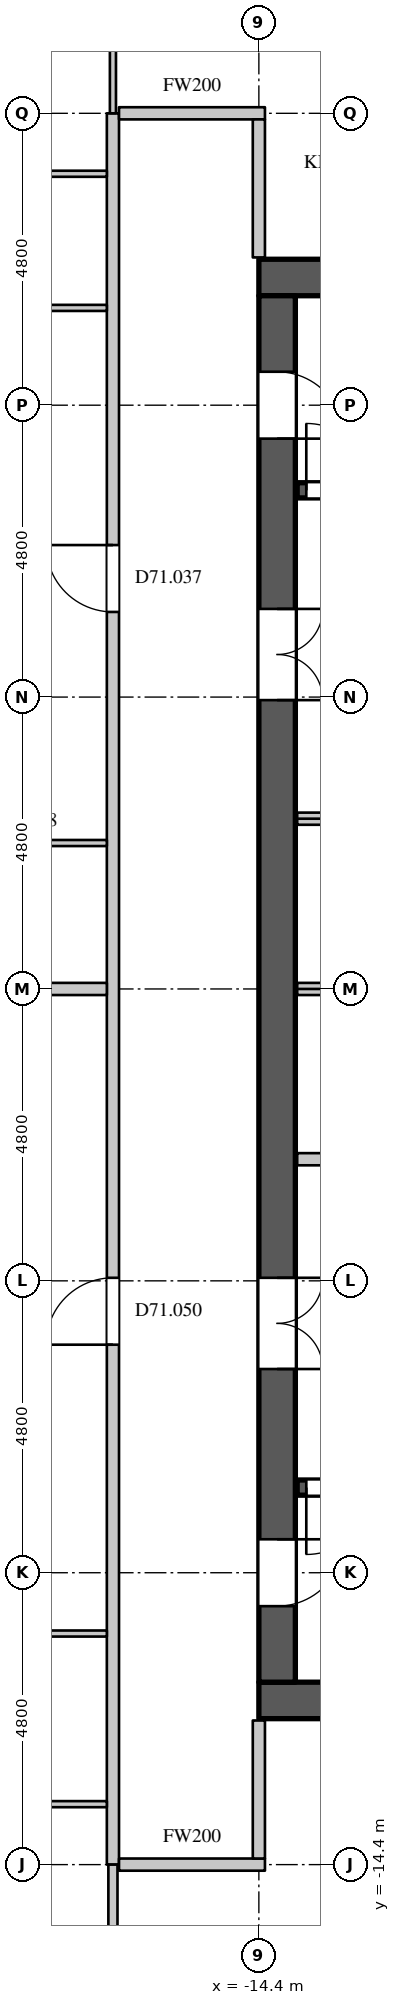
"""IFC4 building model, lengths in metres.
Left out: names, types, materials, properties, quantities, classifications, styles, units other than length and angle.
Written with IfcOpenShell. Run it as: python <this file> out.ifc"""

import sys

from ifc_helpers import new_model, si_unit, direction, frame, frame_2d, origin, place, context, subcontext, project, spatial, rectangle, extrude, element, fill, save


model = new_model("IFC4")
c1 = context("Model", 3, precision=1e-05, world=origin(), true_north=direction((0.0, 1.0)))
c2 = subcontext(c1, "Body", "Model", "MODEL_VIEW")
j1 = project(units=[si_unit("LENGTHUNIT", "METRE"), si_unit("PLANEANGLEUNIT", "RADIAN")], contexts=[c1])
p1 = place(None, origin())
s1 = spatial("IfcSite", under=j1, at=p1, CompositionType="ELEMENT")
p2 = place(p1, origin())
s2 = spatial("IfcBuilding", under=s1, at=p2, CompositionType="ELEMENT")
p3 = place(p2, frame((0.0, 0.0, 306.3)))
s3 = spatial("IfcBuildingStorey", under=s2, at=p3, CompositionType="ELEMENT", Elevation=306.3)
for number, where, z_axis, x_axis in (
    (1, (-14.4, 11.7, 0.0), (0.0, 0.0, 1.0), (1.0, 0.0, 0.0)),
    (2, (-14.4, -11.7, 0.0), (0.0, 0.0, 1.0), (1.0, 0.0, 0.0)),
):
    element("IfcWall", number, at=place(p3, frame(where, z_axis=z_axis, x_axis=x_axis)), inside=s3, PredefinedType="SHEAR", context=c2, shape_type="SweptSolid", body=[
        extrude(rectangle(XDim=28.8, YDim=0.6, at=frame_2d((14.4, 0.0))), origin(), (0.0, 0.0, 1.0), 4.2),
    ])
p4 = place(p3, frame((-14.1, -11.4, 0.0), z_axis=(0.0, 0.0, 1.0), x_axis=(0.0, 1.0, 0.0)))
e3 = element("IfcWall", 3, at=p4, inside=s3, PredefinedType="SHEAR", context=c2, shape_type="SweptSolid", body=[
    extrude(rectangle(XDim=22.8, YDim=0.6, at=frame_2d((11.4, 0.0))), origin(), (0.0, 0.0, 1.0), 4.2),
])
p5 = place(p4, frame((20.45, 0.0, 0.0)))
e4 = element("IfcOpeningElement", 4, at=p5, cuts=e3, PredefinedType="OPENING", context=c2, shape_type="SweptSolid", body=[
    extrude(rectangle(XDim=1.1, YDim=2.2, at=frame_2d((0.55, 1.1))), frame((0.0, 0.31, 0.0), z_axis=(0.0, -1.0, 0.0), x_axis=(1.0, 0.0, 0.0)), (0.0, 0.0, 1.0), 0.62),
])
p6 = place(p4, frame((1.25, 0.0, 0.0)))
e5 = element("IfcOpeningElement", 5, at=p6, cuts=e3, PredefinedType="OPENING", context=c2, shape_type="SweptSolid", body=[
    extrude(rectangle(XDim=1.1, YDim=2.2, at=frame_2d((0.55, 1.1))), frame((0.0, 0.31, 0.0), z_axis=(0.0, -1.0, 0.0), x_axis=(1.0, 0.0, 0.0)), (0.0, 0.0, 1.0), 0.62),
])
p7 = place(p4, frame((16.15, 0.0, 0.0)))
e6 = element("IfcOpeningElement", 6, at=p7, cuts=e3, PredefinedType="OPENING", context=c2, shape_type="SweptSolid", body=[
    extrude(rectangle(XDim=1.5, YDim=2.4, at=frame_2d((0.75, 1.2))), frame((0.0, 0.31, 0.0), z_axis=(0.0, -1.0, 0.0), x_axis=(1.0, 0.0, 0.0)), (0.0, 0.0, 1.0), 0.62),
])
p8 = place(p4, frame((5.15, 0.0, 0.0)))
e7 = element("IfcOpeningElement", 7, at=p8, cuts=e3, PredefinedType="OPENING", context=c2, shape_type="SweptSolid", body=[
    extrude(rectangle(XDim=1.5, YDim=2.4, at=frame_2d((0.75, 1.2))), frame((0.0, 0.31, 0.0), z_axis=(0.0, -1.0, 0.0), x_axis=(1.0, 0.0, 0.0)), (0.0, 0.0, 1.0), 0.62),
])
p9 = place(p3, frame((-16.8, -14.4, 0.0), z_axis=(0.0, 0.0, 1.0), x_axis=(0.0, 1.0, 0.0)))
e8 = element("IfcWall", 8, at=p9, inside=s3, PredefinedType="PARTITIONING", context=c2, shape_type="SweptSolid", body=[
    extrude(rectangle(XDim=28.8, YDim=0.2, at=frame_2d((14.4, 0.0))), origin(), (0.0, 0.0, 1.0), 3.9),
])
p10 = place(p9, frame((20.6, 0.0, 0.0)))
e9 = element("IfcOpeningElement", 9, at=p10, cuts=e8, PredefinedType="OPENING", context=c2, shape_type="SweptSolid", body=[
    extrude(rectangle(XDim=1.1, YDim=2.4, at=frame_2d((0.55, 1.2))), frame((0.0, 0.11, 0.0), z_axis=(0.0, -1.0, 0.0), x_axis=(1.0, 0.0, 0.0)), (0.0, 0.0, 1.0), 0.22),
])
p11 = place(p9, frame((8.55, 0.0, 0.0)))
e10 = element("IfcOpeningElement", 10, at=p11, cuts=e8, PredefinedType="OPENING", context=c2, shape_type="SweptSolid", body=[
    extrude(rectangle(XDim=1.1, YDim=2.4, at=frame_2d((0.55, 1.2))), frame((0.0, 0.11, 0.0), z_axis=(0.0, -1.0, 0.0), x_axis=(1.0, 0.0, 0.0)), (0.0, 0.0, 1.0), 0.22),
])
for number, where, z_axis, x_axis in (
    (11, (-16.7, -14.4, 0.0), (0.0, 0.0, 1.0), (1.0, 0.0, 0.0)),
    (12, (-16.7, 14.4, 0.0), (0.0, 0.0, 1.0), (1.0, 0.0, 0.0)),
):
    element("IfcWall", number, at=place(p3, frame(where, z_axis=z_axis, x_axis=x_axis)), inside=s3, PredefinedType="PARTITIONING", context=c2, shape_type="SweptSolid", body=[
        extrude(rectangle(XDim=2.4, YDim=0.2, at=frame_2d((1.2, 0.0))), origin(), (0.0, 0.0, 1.0), 3.9),
    ])
for number, where, z_axis, x_axis in (
    (13, (-14.4, -14.3, 0.0), (0.0, 0.0, 1.0), (0.0, 1.0, 0.0)),
    (14, (-14.4, 12.03, 0.0), (0.0, 0.0, 1.0), (0.0, 1.0, 0.0)),
):
    element("IfcWall", number, at=place(p3, frame(where, z_axis=z_axis, x_axis=x_axis)), inside=s3, PredefinedType="PARTITIONING", context=c2, shape_type="SweptSolid", body=[
        extrude(rectangle(XDim=2.27, YDim=0.2, at=frame_2d((1.135, 0.0))), origin(), (0.0, 0.0, 1.0), 3.9),
    ])
p12 = place(p3, frame((-16.8, -19.828, 0.0), z_axis=(0.0, 0.0, 1.0), x_axis=(0.0, 1.0, 0.0)))
e15 = element("IfcWall", 15, at=p12, inside=s3, PredefinedType="PARTITIONING", context=c2, shape_type="SweptSolid", body=[
    extrude(rectangle(XDim=5.428, YDim=0.15, at=frame_2d((2.714, 0.0))), origin(), (0.0, 0.0, 1.0), 3.9),
])
p13 = place(p12, frame((2.45, 0.0, 0.0)))
e16 = element("IfcOpeningElement", 16, at=p13, cuts=e15, PredefinedType="OPENING", context=c2, shape_type="SweptSolid", body=[
    extrude(rectangle(XDim=0.9, YDim=2.2, at=frame_2d((0.45, 1.1))), frame((0.0, 0.085, 0.0), z_axis=(0.0, -1.0, 0.0), x_axis=(1.0, 0.0, 0.0)), (0.0, 0.0, 1.0), 0.17),
])
p14 = place(p3, frame((-26.455, 0.0, 0.0), z_axis=(0.0, 0.0, 1.0), x_axis=(1.0, 0.0, 0.0)))
e17 = element("IfcWall", 17, at=p14, inside=s3, PredefinedType="PARTITIONING", context=c2, shape_type="SweptSolid", body=[
    extrude(rectangle(XDim=9.555, YDim=0.2, at=frame_2d((4.778, 0.0))), origin(), (0.0, 0.0, 1.0), 3.9),
])
p15 = place(p3, frame((-13.77, -2.8, 0.0), z_axis=(0.0, 0.0, 1.0), x_axis=(1.0, 0.0, 0.0)))
e18 = element("IfcWall", 18, at=p15, inside=s3, PredefinedType="PARTITIONING", context=c2, shape_type="SweptSolid", body=[
    extrude(rectangle(XDim=3.37, YDim=0.2, at=frame_2d((1.685, 0.0))), origin(), (0.0, 0.0, 1.0), 3.9),
])
p16 = place(p15, frame((1.35, 0.0, 0.0)))
e19 = element("IfcOpeningElement", 19, at=p16, cuts=e18, PredefinedType="OPENING", context=c2, shape_type="SweptSolid", body=[
    extrude(rectangle(XDim=0.6, YDim=2.0, at=frame_2d((0.3, 1.0))), frame((0.0, 0.11, 0.0), z_axis=(0.0, -1.0, 0.0), x_axis=(1.0, 0.0, 0.0)), (0.0, 0.0, 1.0), 0.22),
])
p17 = place(p3, frame((-13.77, 0.0, 0.0), z_axis=(0.0, 0.0, 1.0), x_axis=(1.0, 0.0, 0.0)))
e20 = element("IfcWall", 20, at=p17, inside=s3, PredefinedType="PARTITIONING", context=c2, shape_type="SweptSolid", body=[
    extrude(rectangle(XDim=21.57, YDim=0.2, at=frame_2d((10.785, 0.0))), origin(), (0.0, 0.0, 1.0), 3.9),
])
p18 = place(p3, frame((-13.77, 2.8, 0.0), z_axis=(0.0, 0.0, 1.0), x_axis=(1.0, 0.0, 0.0)))
e21 = element("IfcWall", 21, at=p18, inside=s3, PredefinedType="PARTITIONING", context=c2, shape_type="SweptSolid", body=[
    extrude(rectangle(XDim=5.95, YDim=0.2, at=frame_2d((2.975, 0.0))), origin(), (0.0, 0.0, 1.0), 3.9),
])
p19 = place(p18, frame((1.1, 0.0, 0.0)))
e22 = element("IfcOpeningElement", 22, at=p19, cuts=e21, PredefinedType="OPENING", context=c2, shape_type="SweptSolid", body=[
    extrude(rectangle(XDim=1.1, YDim=2.2, at=frame_2d((0.55, 1.1))), frame((0.0, 0.11, 0.0), z_axis=(0.0, -1.0, 0.0), x_axis=(1.0, 0.0, 0.0)), (0.0, 0.0, 1.0), 0.22),
])
p20 = place(p18, frame((4.1, 0.0, 0.0)))
e23 = element("IfcOpeningElement", 23, at=p20, cuts=e21, PredefinedType="OPENING", context=c2, shape_type="SweptSolid", body=[
    extrude(rectangle(XDim=1.1, YDim=2.2, at=frame_2d((0.55, 1.1))), frame((0.0, 0.11, 0.0), z_axis=(0.0, -1.0, 0.0), x_axis=(1.0, 0.0, 0.0)), (0.0, 0.0, 1.0), 0.22),
])
p21 = place(p3, frame((-13.77, -8.2, 0.0), z_axis=(0.0, 0.0, 1.0), x_axis=(1.0, 0.0, 0.0)))
e24 = element("IfcWall", 24, at=p21, inside=s3, PredefinedType="SHEAR", context=c2, shape_type="SweptSolid", body=[
    extrude(rectangle(XDim=8.495, YDim=0.25, at=frame_2d((4.248, 0.0))), origin(), (0.0, 0.0, 1.0), 3.9),
])
p22 = place(p21, frame((0.15, 0.0, 0.0)))
e25 = element("IfcOpeningElement", 25, at=p22, cuts=e24, PredefinedType="OPENING", context=c2, shape_type="SweptSolid", body=[
    extrude(rectangle(XDim=1.1, YDim=2.2, at=frame_2d((0.55, 1.1))), frame((0.0, 0.135, 0.0), z_axis=(0.0, -1.0, 0.0), x_axis=(1.0, 0.0, 0.0)), (0.0, 0.0, 1.0), 0.27),
])
p23 = place(p3, frame((-13.77, 8.2, 0.0), z_axis=(0.0, 0.0, 1.0), x_axis=(1.0, 0.0, 0.0)))
e26 = element("IfcWall", 26, at=p23, inside=s3, PredefinedType="SHEAR", context=c2, shape_type="SweptSolid", body=[
    extrude(rectangle(XDim=8.495, YDim=0.25, at=frame_2d((4.248, 0.0))), origin(), (0.0, 0.0, 1.0), 3.9),
])
p24 = place(p23, frame((0.15, 0.0, 0.0)))
e27 = element("IfcOpeningElement", 27, at=p24, cuts=e26, PredefinedType="OPENING", context=c2, shape_type="SweptSolid", body=[
    extrude(rectangle(XDim=1.1, YDim=2.2, at=frame_2d((0.55, 1.1))), frame((0.0, 0.135, 0.0), z_axis=(0.0, -1.0, 0.0), x_axis=(1.0, 0.0, 0.0)), (0.0, 0.0, 1.0), 0.27),
])
p25 = place(p3, frame((-20.55, -13.406, 0.0), z_axis=(0.0, 0.0, 1.0), x_axis=(1.0, 0.0, 0.0)))
e28 = element("IfcWall", 28, at=p25, inside=s3, PredefinedType="PARTITIONING", context=c2, shape_type="SweptSolid", body=[
    extrude(rectangle(XDim=3.65, YDim=0.1, at=frame_2d((1.825, 0.0))), origin(), (0.0, 0.0, 1.0), 3.9),
])
p26 = place(p3, frame((-20.475, -10.6, 0.0), z_axis=(0.0, 0.0, 1.0), x_axis=(1.0, 0.0, 0.0)))
e29 = element("IfcWall", 29, at=p26, inside=s3, PredefinedType="PARTITIONING", context=c2, shape_type="SweptSolid", body=[
    extrude(rectangle(XDim=3.575, YDim=0.1, at=frame_2d((1.788, 0.0))), origin(), (0.0, 0.0, 1.0), 3.9),
])
p27 = place(p26, frame((1.3, 0.0, 0.0)))
e30 = element("IfcOpeningElement", 30, at=p27, cuts=e29, PredefinedType="OPENING", context=c2, shape_type="SweptSolid", body=[
    extrude(rectangle(XDim=0.9, YDim=2.2, at=frame_2d((0.45, 1.1))), frame((0.0, 0.06, 0.0), z_axis=(0.0, -1.0, 0.0), x_axis=(1.0, 0.0, 0.0)), (0.0, 0.0, 1.0), 0.12),
])
p28 = place(p3, frame((-20.275, 2.4, 0.0), z_axis=(0.0, 0.0, 1.0), x_axis=(1.0, 0.0, 0.0)))
e31 = element("IfcWall", 31, at=p28, inside=s3, PredefinedType="PARTITIONING", context=c2, shape_type="SweptSolid", body=[
    extrude(rectangle(XDim=3.375, YDim=0.1, at=frame_2d((1.688, 0.0))), origin(), (0.0, 0.0, 1.0), 3.9),
])
p29 = place(p28, frame((1.2, 0.0, 0.0)))
e32 = element("IfcOpeningElement", 32, at=p29, cuts=e31, PredefinedType="OPENING", context=c2, shape_type="SweptSolid", body=[
    extrude(rectangle(XDim=0.9, YDim=2.2, at=frame_2d((0.45, 1.1))), frame((0.0, 0.06, 0.0), z_axis=(0.0, -1.0, 0.0), x_axis=(1.0, 0.0, 0.0)), (0.0, 0.0, 1.0), 0.12),
])
p30 = place(p3, frame((-18.975, 11.2, 0.0), z_axis=(0.0, 0.0, 1.0), x_axis=(1.0, 0.0, 0.0)))
e33 = element("IfcWall", 33, at=p30, inside=s3, PredefinedType="PARTITIONING", context=c2, shape_type="SweptSolid", body=[
    extrude(rectangle(XDim=2.075, YDim=0.1, at=frame_2d((1.038, 0.0))), origin(), (0.0, 0.0, 1.0), 3.3),
])
p31 = place(p30, frame((0.15, 0.0, 0.0)))
e34 = element("IfcOpeningElement", 34, at=p31, cuts=e33, PredefinedType="OPENING", context=c2, shape_type="SweptSolid", body=[
    extrude(rectangle(XDim=0.9, YDim=2.2, at=frame_2d((0.45, 1.1))), frame((0.0, 0.06, 0.0), z_axis=(0.0, -1.0, 0.0), x_axis=(1.0, 0.0, 0.0)), (0.0, 0.0, 1.0), 0.12),
])
p32 = place(p3, frame((-19.9, 13.406, 0.0), z_axis=(0.0, 0.0, 1.0), x_axis=(1.0, 0.0, 0.0)))
e35 = element("IfcWall", 35, at=p32, inside=s3, PredefinedType="PARTITIONING", context=c2, shape_type="SweptSolid", body=[
    extrude(rectangle(XDim=3.0, YDim=0.1, at=frame_2d((1.5, 0.0))), origin(), (0.0, 0.0, 1.0), 3.9),
])
p33 = place(p3, frame((-16.8, 14.4, 0.0), z_axis=(0.0, 0.0, 1.0), x_axis=(0.0, 1.0, 0.0)))
e36 = element("IfcWall", 36, at=p33, inside=s3, PredefinedType="PARTITIONING", context=c2, shape_type="SweptSolid", body=[
    extrude(rectangle(XDim=3.9, YDim=0.1, at=frame_2d((1.95, 0.0))), origin(), (0.0, 0.0, 1.0), 3.9),
])
p34 = place(p24, origin())
e37 = element("IfcDoor", 37, at=p34, inside=s3, OperationType="SINGLE_SWING_LEFT", PredefinedType="DOOR", context=c2, shape_type="SweptSolid", body=[
    extrude(rectangle(XDim=1.1, YDim=2.2, at=frame_2d((0.55, 1.1))), frame((0.0, 0.025, 0.0), z_axis=(0.0, -1.0, 0.0), x_axis=(1.0, 0.0, 0.0)), (0.0, 0.0, 1.0), 0.05),
])
fill(e27, e37)
p35 = place(p22, origin())
e38 = element("IfcDoor", 38, at=p35, inside=s3, OperationType="SINGLE_SWING_RIGHT", PredefinedType="DOOR", context=c2, shape_type="SweptSolid", body=[
    extrude(rectangle(XDim=1.1, YDim=2.2, at=frame_2d((0.55, 1.1))), frame((0.0, 0.025, 0.0), z_axis=(0.0, -1.0, 0.0), x_axis=(1.0, 0.0, 0.0)), (0.0, 0.0, 1.0), 0.05),
])
fill(e25, e38)
p36 = place(p5, origin())
e39 = element("IfcDoor", 39, at=p36, inside=s3, OperationType="SINGLE_SWING_RIGHT", PredefinedType="DOOR", context=c2, shape_type="SweptSolid", body=[
    extrude(rectangle(XDim=1.1, YDim=2.2, at=frame_2d((0.55, 1.1))), frame((0.0, -0.245, 0.0), z_axis=(0.0, -1.0, 0.0), x_axis=(1.0, 0.0, 0.0)), (0.0, 0.0, 1.0), 0.05),
])
fill(e4, e39)
p37 = place(p6, origin())
e40 = element("IfcDoor", 40, at=p37, inside=s3, OperationType="SINGLE_SWING_LEFT", PredefinedType="DOOR", context=c2, shape_type="SweptSolid", body=[
    extrude(rectangle(XDim=1.1, YDim=2.2, at=frame_2d((0.55, 1.1))), frame((0.0, -0.245, 0.0), z_axis=(0.0, -1.0, 0.0), x_axis=(1.0, 0.0, 0.0)), (0.0, 0.0, 1.0), 0.05),
])
fill(e5, e40)
p38 = place(p7, origin())
e41 = element("IfcDoor", 41, at=p38, inside=s3, OperationType="DOUBLE_DOOR_SINGLE_SWING", PredefinedType="DOOR", context=c2, shape_type="SweptSolid", body=[
    extrude(rectangle(XDim=1.5, YDim=2.4, at=frame_2d((0.75, 1.2))), frame((0.0, -0.245, 0.0), z_axis=(0.0, -1.0, 0.0), x_axis=(1.0, 0.0, 0.0)), (0.0, 0.0, 1.0), 0.05),
])
fill(e6, e41)
p39 = place(p8, origin())
e42 = element("IfcDoor", 42, at=p39, inside=s3, OperationType="DOUBLE_DOOR_SINGLE_SWING", PredefinedType="DOOR", context=c2, shape_type="SweptSolid", body=[
    extrude(rectangle(XDim=1.5, YDim=2.4, at=frame_2d((0.75, 1.2))), frame((0.0, -0.245, 0.0), z_axis=(0.0, -1.0, 0.0), x_axis=(1.0, 0.0, 0.0)), (0.0, 0.0, 1.0), 0.05),
])
fill(e7, e42)
p40 = place(p10, origin())
e43 = element("IfcDoor", 43, at=p40, inside=s3, OperationType="SINGLE_SWING_RIGHT", PredefinedType="DOOR", context=c2, shape_type="SweptSolid", body=[
    extrude(rectangle(XDim=1.1, YDim=2.4, at=frame_2d((0.55, 1.2))), frame((0.0, 0.025, 0.0), z_axis=(0.0, -1.0, 0.0), x_axis=(1.0, 0.0, 0.0)), (0.0, 0.0, 1.0), 0.05),
])
fill(e9, e43)
p41 = place(p11, origin())
e44 = element("IfcDoor", 44, at=p41, inside=s3, OperationType="SINGLE_SWING_LEFT", PredefinedType="DOOR", context=c2, shape_type="SweptSolid", body=[
    extrude(rectangle(XDim=1.1, YDim=2.4, at=frame_2d((0.55, 1.2))), frame((0.0, 0.025, 0.0), z_axis=(0.0, -1.0, 0.0), x_axis=(1.0, 0.0, 0.0)), (0.0, 0.0, 1.0), 0.05),
])
fill(e10, e44)
save(model, sys.argv[1])
